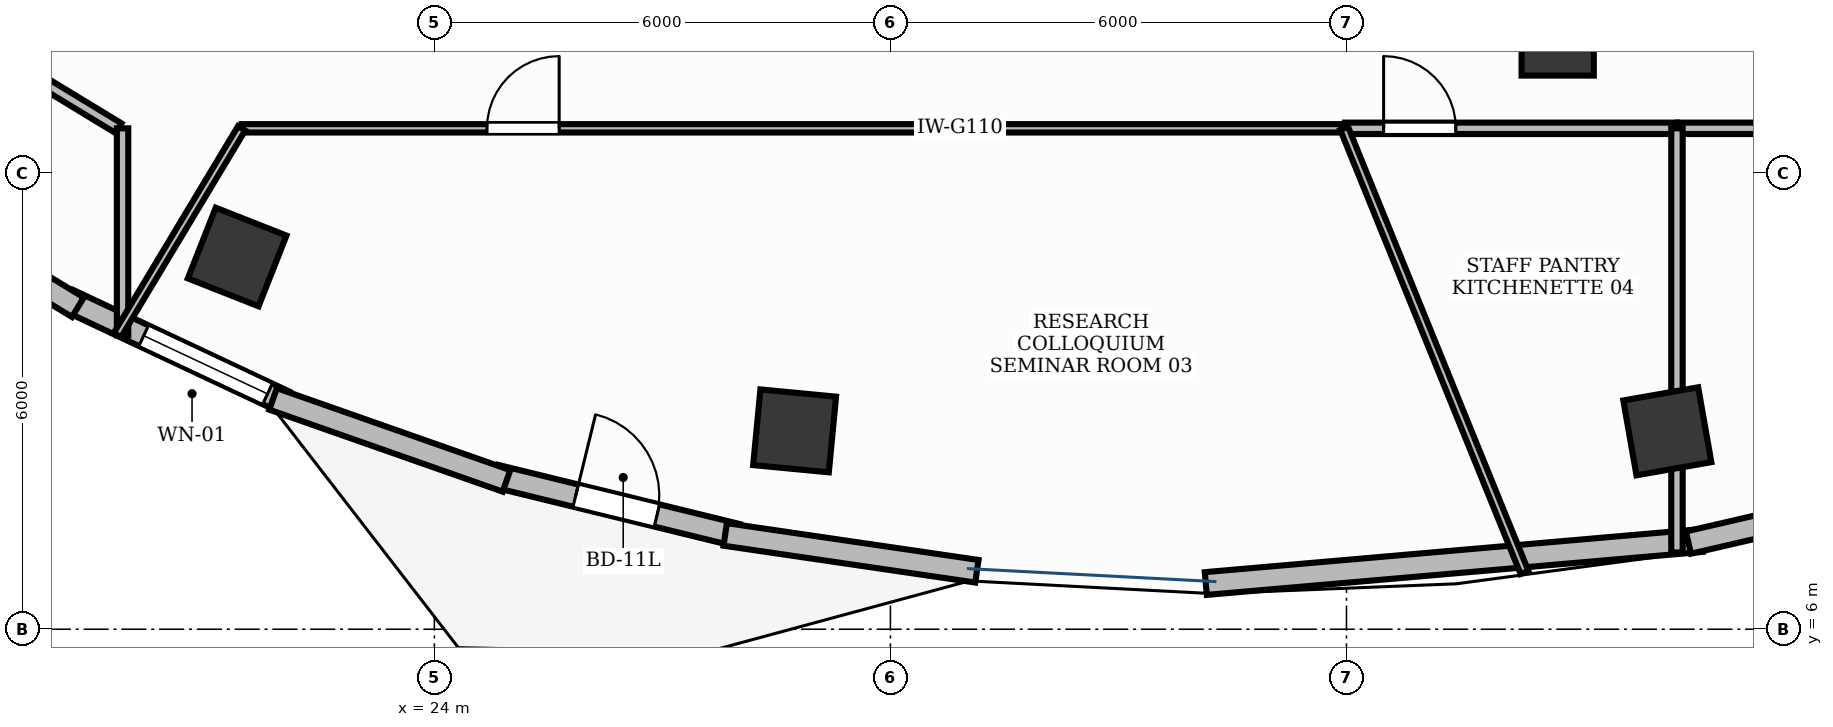
"""IFC4 building model, lengths in metres.
Left out: names, types, materials, properties, quantities, classifications, styles, units other than length and angle.
Written with IfcOpenShell. Run it as: python <this file> out.ifc"""

import sys

from ifc_helpers import new_model, si_unit, direction, frame, frame_2d, origin, origin_2d, place, context, subcontext, project, spatial, rectangle, extrude, element, fill, save


model = new_model("IFC4")
c1 = context("Model", 3, precision=1e-05, world=origin(), true_north=direction((0.0, 1.0)))
c2 = subcontext(c1, "Body", "Model", "MODEL_VIEW")
j1 = project(units=[si_unit("LENGTHUNIT", "METRE"), si_unit("PLANEANGLEUNIT", "RADIAN")], contexts=[c1])
p1 = place(None, origin())
s1 = spatial("IfcSite", under=j1, at=p1, CompositionType="ELEMENT")
p2 = place(p1, origin())
s2 = spatial("IfcBuilding", under=s1, at=p2, CompositionType="ELEMENT")
p3 = place(p2, frame((0.0, 0.0, 196.2)))
s3 = spatial("IfcBuildingStorey", under=s2, at=p3, CompositionType="ELEMENT", Elevation=196.2)
for number, where, z_axis, x_axis in (
    (1, (21.406, 10.897, -0.0), (0.0, 0.0, 1.0), (-0.93, 0.367, 0.0)),
    (2, (28.74, 8.61, -0.0), (0.0, 0.0, 1.0), (-0.995, 0.095, 0.0)),
    (3, (40.221, 8.604, -0.0), (0.0, 0.0, 1.0), (0.985, 0.173, 0.0)),
):
    element("IfcColumn", number, at=place(p3, frame(where, z_axis=z_axis, x_axis=x_axis)), inside=s3, PredefinedType="COLUMN", context=c2, shape_type="SweptSolid", body=[
        extrude(rectangle(XDim=1.0, YDim=1.0, at=origin_2d()), origin(), (0.0, 0.0, 1.0), 3.901),
    ])
p4 = place(p3, frame((38.779, 13.759, -0.0), z_axis=(0.0, 0.0, 1.0), x_axis=(1.0, 0.0, 0.0)))
e4 = element("IfcColumn", 4, at=p4, inside=s3, PredefinedType="COLUMN", context=c2, shape_type="SweptSolid", body=[
    extrude(rectangle(XDim=0.95, YDim=0.95, at=origin_2d()), origin(), (0.0, 0.0, 1.0), 3.901),
])
p5 = place(p3, frame((19.183, 10.329, 0.0), z_axis=(0.0, 0.0, 1.0), x_axis=(0.905013842092, -0.425382117186, 0.0)))
e5 = element("IfcWall", 5, at=p5, inside=s3, PredefinedType="STANDARD", context=c2, shape_type="SweptSolid", body=[
    extrude(rectangle(XDim=3.146, YDim=0.3, at=frame_2d((1.573, 0.0))), origin(), (0.0, 0.0, 1.0), 3.9),
])
p6 = place(p5, frame((1.097, 0.0, 0.9)))
e6 = element("IfcOpeningElement", 6, at=p6, cuts=e5, PredefinedType="OPENING", context=c2, shape_type="SweptSolid", body=[
    extrude(rectangle(XDim=1.8, YDim=2.1, at=frame_2d((0.9, 1.05))), frame((0.0, 0.165, 0.0), z_axis=(0.0, -1.0, 0.0), x_axis=(1.0, 0.0, 0.0)), (0.0, 0.0, 1.0), 0.33),
])
p7 = place(p3, frame((24.807, 8.016, 0.0), z_axis=(0.0, 0.0, 1.0), x_axis=(0.971312804689, -0.237805457142, 0.0)))
e7 = element("IfcWall", 7, at=p7, inside=s3, PredefinedType="STANDARD", context=c2, shape_type="SweptSolid", body=[
    extrude(rectangle(XDim=3.269, YDim=0.3, at=frame_2d((1.634, 0.0))), origin(), (0.0, 0.0, 1.0), 3.9),
])
p8 = place(p7, frame((1.084, 0.0, 0.0)))
e8 = element("IfcOpeningElement", 8, at=p8, cuts=e7, PredefinedType="OPENING", context=c2, shape_type="SweptSolid", body=[
    extrude(rectangle(XDim=1.1, YDim=2.15, at=frame_2d((0.55, 1.075))), frame((0.0, 0.165, 0.0), z_axis=(0.0, -1.0, 0.0), x_axis=(1.0, 0.0, 0.0)), (0.0, 0.0, 1.0), 0.33),
])
p9 = place(p3, frame((16.656, 11.85, 0.0), z_axis=(0.0, 0.0, 1.0), x_axis=(0.854580756668, -0.519318524928, 0.0)))
e9 = element("IfcWall", 9, at=p9, inside=s3, PredefinedType="STANDARD", context=c2, shape_type="SweptSolid", body=[
    extrude(rectangle(XDim=3.106, YDim=0.3, at=frame_2d((1.553, 0.0))), origin(), (0.0, 0.0, 1.0), 3.9),
])
p10 = place(p3, frame((21.878, 9.03, 0.0), z_axis=(0.0, 0.0, 1.0), x_axis=(0.94352100271, -0.331312718509, 0.0)))
e10 = element("IfcWall", 10, at=p10, inside=s3, PredefinedType="STANDARD", context=c2, shape_type="SweptSolid", body=[
    extrude(rectangle(XDim=3.254, YDim=0.3, at=frame_2d((1.627, 0.0))), origin(), (0.0, 0.0, 1.0), 3.9),
])
p11 = place(p3, frame((27.826, 7.247, 0.0), z_axis=(0.0, 0.0, 1.0), x_axis=(0.98945927954, -0.144811374319, 0.0)))
e11 = element("IfcWall", 11, at=p11, inside=s3, PredefinedType="STANDARD", context=c2, shape_type="SweptSolid", body=[
    extrude(rectangle(XDim=3.346, YDim=0.3, at=frame_2d((1.673, 0.0))), origin(), (0.0, 0.0, 1.0), 3.9),
])
p12 = place(p3, frame((34.149, 6.601, 0.0), z_axis=(0.0, 0.0, 1.0), x_axis=(0.996255675021, 0.086455942472, 0.0)))
e12 = element("IfcWall", 12, at=p12, inside=s3, PredefinedType="STANDARD", context=c2, shape_type="SweptSolid", body=[
    extrude(rectangle(XDim=6.551, YDim=0.3, at=frame_2d((3.276, 0.0))), origin(), (0.0, 0.0, 1.0), 3.9),
])
p13 = place(p3, frame((40.499, 7.14, 0.0), z_axis=(0.0, 0.0, 1.0), x_axis=(0.974179712493, 0.225773974956, 0.0)))
e13 = element("IfcWall", 13, at=p13, inside=s3, PredefinedType="STANDARD", context=c2, shape_type="SweptSolid", body=[
    extrude(rectangle(XDim=3.314, YDim=0.3, at=frame_2d((1.657, 0.0))), origin(), (0.0, 0.0, 1.0), 3.9),
])
p14 = place(p3, frame((21.464, 12.59, 0.0), z_axis=(0.0, 0.0, 1.0), x_axis=(1.0, 0.0, 0.0)))
e14 = element("IfcWall", 14, at=p14, inside=s3, PredefinedType="MOVABLE", context=c2, shape_type="SweptSolid", body=[
    extrude(rectangle(XDim=14.505, YDim=0.11, at=frame_2d((7.252, 0.0))), origin(), (0.0, 0.0, 1.0), 2.22),
])
p15 = place(p14, frame((3.228, 0.0, 0.0)))
e15 = element("IfcOpeningElement", 15, at=p15, cuts=e14, PredefinedType="OPENING", context=c2, shape_type="SweptSolid", body=[
    extrude(rectangle(XDim=0.95, YDim=2.15, at=frame_2d((0.475, 1.075))), frame((0.0, 0.07, 0.0), z_axis=(0.0, -1.0, 0.0), x_axis=(1.0, 0.0, 0.0)), (0.0, 0.0, 1.0), 0.14),
])
p16 = place(p3, frame((35.98, 12.59, 0.0), z_axis=(0.0, 0.0, 1.0), x_axis=(1.0, 0.0, 0.0)))
e16 = element("IfcWall", 16, at=p16, inside=s3, PredefinedType="PARTITIONING", context=c2, shape_type="SweptSolid", body=[
    extrude(rectangle(XDim=4.368, YDim=0.15, at=frame_2d((2.184, 0.0))), origin(), (0.0, 0.0, 1.0), 2.22),
])
p17 = place(p16, frame((0.508, 0.0, 0.0)))
e17 = element("IfcOpeningElement", 17, at=p17, cuts=e16, PredefinedType="OPENING", context=c2, shape_type="SweptSolid", body=[
    extrude(rectangle(XDim=0.95, YDim=2.15, at=frame_2d((0.475, 1.075))), frame((0.0, 0.09, 0.0), z_axis=(0.0, -1.0, 0.0), x_axis=(1.0, 0.0, 0.0)), (0.0, 0.0, 1.0), 0.18),
])
p18 = place(p3, frame((40.358, 12.59, 0.0), z_axis=(0.0, 0.0, 1.0), x_axis=(1.0, 0.0, 0.0)))
e18 = element("IfcWall", 18, at=p18, inside=s3, PredefinedType="PARTITIONING", context=c2, shape_type="SweptSolid", body=[
    extrude(rectangle(XDim=4.142, YDim=0.15, at=frame_2d((2.071, 0.0))), origin(), (0.0, 0.0, 1.0), 2.22),
])
p19 = place(p18, frame((2.952, 0.0, 0.0)))
e19 = element("IfcOpeningElement", 19, at=p19, cuts=e18, PredefinedType="OPENING", context=c2, shape_type="SweptSolid", body=[
    extrude(rectangle(XDim=0.95, YDim=2.15, at=frame_2d((0.475, 1.075))), frame((0.0, 0.09, 0.0), z_axis=(0.0, -1.0, 0.0), x_axis=(1.0, 0.0, 0.0)), (0.0, 0.0, 1.0), 0.18),
])
p20 = place(p3, frame((18.031, 13.694, 0.0), z_axis=(0.0, 0.0, 1.0), x_axis=(0.85454497186, -0.51937740716, 0.0)))
e20 = element("IfcWall", 20, at=p20, inside=s3, PredefinedType="PARTITIONING", context=c2, shape_type="SweptSolid", body=[
    extrude(rectangle(XDim=2.122, YDim=0.15, at=frame_2d((1.061, 0.0))), origin(), (0.0, 0.0, 1.0), 2.22),
])
p21 = place(p3, frame((19.898, 12.59, 0.0), z_axis=(0.0, 0.0, 1.0), x_axis=(0.0, -1.0, 0.0)))
e21 = element("IfcWall", 21, at=p21, inside=s3, PredefinedType="PARTITIONING", context=c2, shape_type="SweptSolid", body=[
    extrude(rectangle(XDim=2.724, YDim=0.15, at=frame_2d((1.362, 0.0))), origin(), (0.0, 0.0, 1.0), 2.22),
])
p22 = place(p3, frame((19.831, 9.871, 0.0), z_axis=(0.0, 0.0, 1.0), x_axis=(0.51499369767, 0.857193963675, 0.0)))
e22 = element("IfcWall", 22, at=p22, inside=s3, PredefinedType="MOVABLE", context=c2, shape_type="SweptSolid", body=[
    extrude(rectangle(XDim=3.172, YDim=0.11, at=frame_2d((1.586, 0.0))), origin(), (0.0, 0.0, 1.0), 2.22),
])
p23 = place(p3, frame((35.969, 12.59, 0.0), z_axis=(0.0, 0.0, 1.0), x_axis=(0.376224407508, -0.92652857225, 0.0)))
e23 = element("IfcWall", 23, at=p23, inside=s3, PredefinedType="MOVABLE", context=c2, shape_type="SweptSolid", body=[
    extrude(rectangle(XDim=6.307, YDim=0.11, at=frame_2d((3.153, 0.0))), origin(), (0.0, 0.0, 1.0), 2.22),
])
p24 = place(p3, frame((40.348, 12.59, 0.0), z_axis=(0.0, 0.0, 1.0), x_axis=(0.0, -1.0, 0.0)))
e24 = element("IfcWall", 24, at=p24, inside=s3, PredefinedType="PARTITIONING", context=c2, shape_type="SweptSolid", body=[
    extrude(rectangle(XDim=5.581, YDim=0.15, at=frame_2d((2.791, 0.0))), origin(), (0.0, 0.0, 1.0), 2.22),
])
p25 = place(p6, origin())
e25 = element("IfcWindow", 25, at=p25, inside=s3, PartitioningType="SINGLE_PANEL", PredefinedType="WINDOW", context=c2, shape_type="SweptSolid", body=[
    extrude(rectangle(XDim=1.8, YDim=2.1, at=frame_2d((0.9, 1.05))), frame((0.0, 0.03, 0.0), z_axis=(0.0, -1.0, 0.0), x_axis=(1.0, 0.0, 0.0)), (0.0, 0.0, 1.0), 0.06),
])
fill(e6, e25)
p26 = place(p8, origin())
e26 = element("IfcDoor", 26, at=p26, inside=s3, OperationType="SINGLE_SWING_LEFT", PredefinedType="DOOR", context=c2, shape_type="SweptSolid", body=[
    extrude(rectangle(XDim=1.1, YDim=2.15, at=frame_2d((0.55, 1.075))), frame((0.0, 0.025, 0.0), z_axis=(0.0, -1.0, 0.0), x_axis=(1.0, 0.0, 0.0)), (0.0, 0.0, 1.0), 0.05),
])
fill(e8, e26)
p27 = place(p15, origin())
e27 = element("IfcDoor", 27, at=p27, inside=s3, OperationType="SINGLE_SWING_RIGHT", PredefinedType="DOOR", context=c2, shape_type="SweptSolid", body=[
    extrude(rectangle(XDim=0.95, YDim=2.15, at=frame_2d((0.475, 1.075))), frame((0.0, 0.025, 0.0), z_axis=(0.0, -1.0, 0.0), x_axis=(1.0, 0.0, 0.0)), (0.0, 0.0, 1.0), 0.05),
])
fill(e15, e27)
p28 = place(p17, origin())
e28 = element("IfcDoor", 28, at=p28, inside=s3, OperationType="SINGLE_SWING_LEFT", PredefinedType="DOOR", context=c2, shape_type="SweptSolid", body=[
    extrude(rectangle(XDim=0.95, YDim=2.15, at=frame_2d((0.475, 1.075))), frame((0.0, 0.025, 0.0), z_axis=(0.0, -1.0, 0.0), x_axis=(1.0, 0.0, 0.0)), (0.0, 0.0, 1.0), 0.05),
])
fill(e17, e28)
save(model, sys.argv[1])
